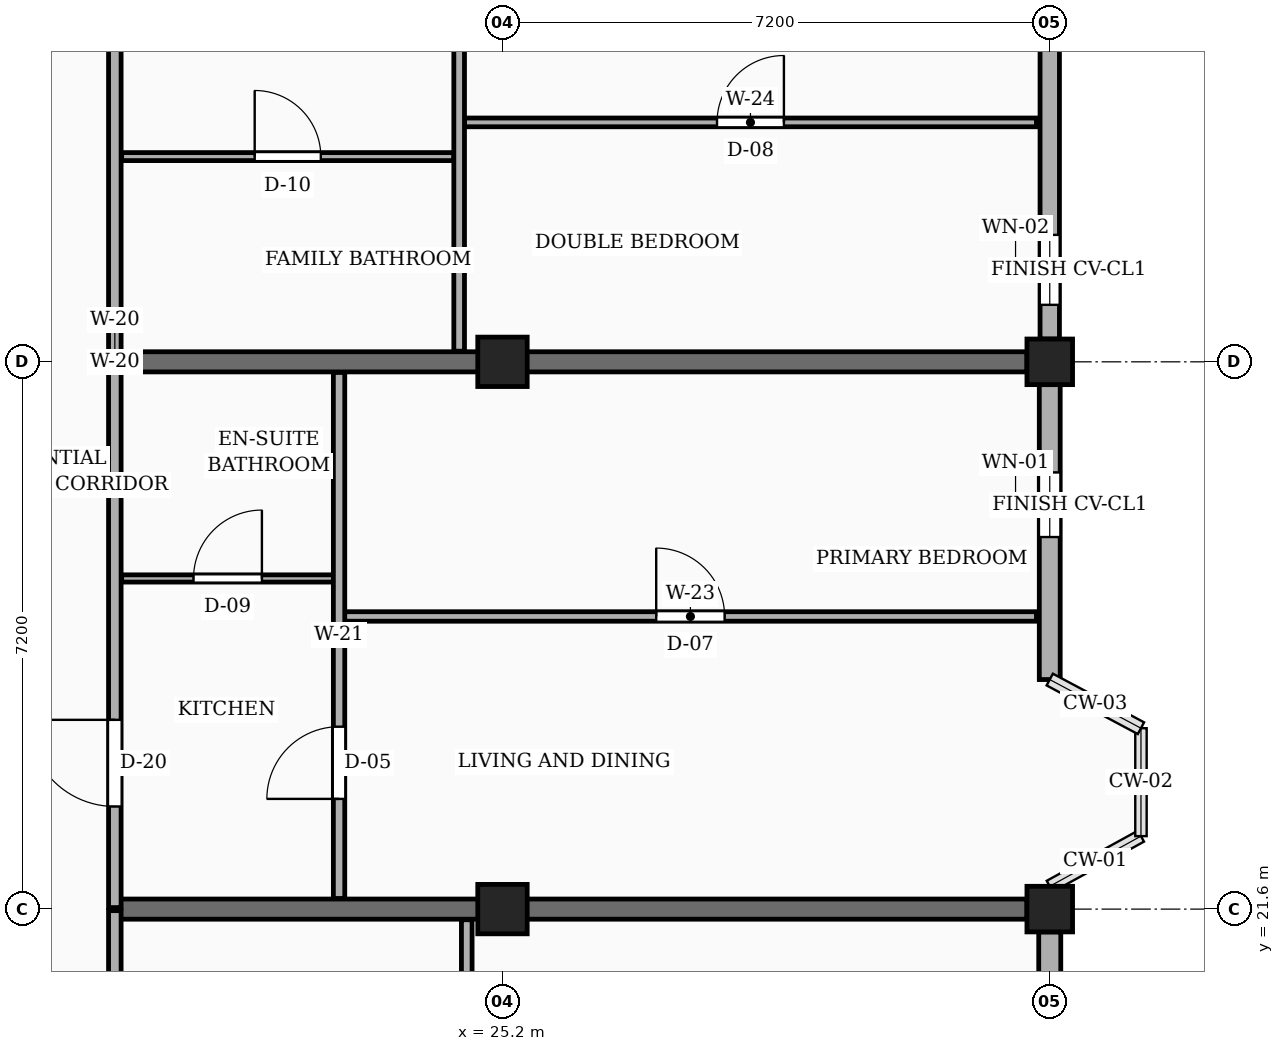
"""IFC4 building model, lengths in metres.
Left out: names, types, materials, properties, quantities, classifications, styles, units other than length and angle.
Written with IfcOpenShell. Run it as: python <this file> out.ifc"""

import sys

from ifc_helpers import new_model, si_unit, direction, frame, frame_2d, origin, origin_2d, place, context, subcontext, project, spatial, rectangle, extrude, element, fill, save


model = new_model("IFC4")
c1 = context("Model", 3, precision=1e-05, world=origin(), true_north=direction((0.0, 1.0)))
c2 = subcontext(c1, "Body", "Model", "MODEL_VIEW")
j1 = project(units=[si_unit("LENGTHUNIT", "METRE"), si_unit("PLANEANGLEUNIT", "RADIAN")], contexts=[c1])
p1 = place(None, origin())
s1 = spatial("IfcSite", under=j1, at=p1, CompositionType="ELEMENT")
p2 = place(p1, origin())
s2 = spatial("IfcBuilding", under=s1, at=p2, CompositionType="ELEMENT")
p3 = place(p2, frame((0.0, 0.0, 7.65)))
s3 = spatial("IfcBuildingStorey", under=s2, at=p3, CompositionType="ELEMENT", Elevation=7.65)
for number, where, z_axis, x_axis in (
    (1, (25.2, 21.6, 0.0), (0.0, 0.0, 1.0), (1.0, 0.0, 0.0)),
    (2, (25.2, 28.8, 0.0), (0.0, 0.0, 1.0), (1.0, 0.0, 0.0)),
):
    element("IfcColumn", number, at=place(p3, frame(where, z_axis=z_axis, x_axis=x_axis)), inside=s3, PredefinedType="COLUMN", context=c2, shape_type="SweptSolid", body=[
        extrude(rectangle(XDim=0.65, YDim=0.65, at=origin_2d()), origin(), (0.0, 0.0, 1.0), 3.15),
    ])
for number, where, z_axis, x_axis in (
    (3, (32.4, 21.6, 0.0), (0.0, 0.0, 1.0), (1.0, 0.0, 0.0)),
    (4, (32.4, 28.8, 0.0), (0.0, 0.0, 1.0), (1.0, 0.0, 0.0)),
):
    element("IfcColumn", number, at=place(p3, frame(where, z_axis=z_axis, x_axis=x_axis)), inside=s3, PredefinedType="COLUMN", context=c2, shape_type="SweptSolid", body=[
        extrude(rectangle(XDim=0.6, YDim=0.6, at=origin_2d()), origin(), (0.0, 0.0, 1.0), 3.15),
    ])
for number, where, z_axis, x_axis in (
    (5, (20.1, 21.6, 0.0), (0.0, 0.0, 1.0), (1.0, 0.0, 0.0)),
    (6, (20.1, 28.8, 0.0), (0.0, 0.0, 1.0), (1.0, 0.0, 0.0)),
):
    element("IfcWall", number, at=place(p3, frame(where, z_axis=z_axis, x_axis=x_axis)), inside=s3, PredefinedType="SOLIDWALL", context=c2, shape_type="SweptSolid", body=[
        extrude(rectangle(XDim=12.0, YDim=0.265, at=frame_2d((6.0, 0.0))), origin(), (0.0, 0.0, 1.0), 2.17),
    ])
p4 = place(p3, frame((32.4, 14.7, 0.0), z_axis=(0.0, 0.0, 1.0), x_axis=(0.0, 1.0, 0.0)))
e7 = element("IfcWall", 7, at=p4, inside=s3, PredefinedType="SOLIDWALL", context=c2, shape_type="SweptSolid", body=[
    extrude(rectangle(XDim=6.6, YDim=0.29, at=frame_2d((3.3, 0.0))), origin(), (0.0, 0.0, 1.0), 2.44),
])
p5 = place(p4, frame((0.45, 0.0, 0.78)))
e8 = element("IfcOpeningElement", 8, at=p5, cuts=e7, PredefinedType="OPENING", context=c2, shape_type="SweptSolid", body=[
    extrude(rectangle(XDim=1.35, YDim=1.44, at=frame_2d((0.675, 0.72))), frame((0.0, 0.155, 0.0), z_axis=(0.0, -1.0, 0.0), x_axis=(1.0, 0.0, 0.0)), (0.0, 0.0, 1.0), 0.31),
])
p6 = place(p4, frame((4.65, 0.0, 0.78)))
e9 = element("IfcOpeningElement", 9, at=p6, cuts=e7, PredefinedType="OPENING", context=c2, shape_type="SweptSolid", body=[
    extrude(rectangle(XDim=0.85, YDim=1.15, at=frame_2d((0.425, 0.575))), frame((0.0, 0.155, 0.0), z_axis=(0.0, -1.0, 0.0), x_axis=(1.0, 0.0, 0.0)), (0.0, 0.0, 1.0), 0.31),
])
p7 = place(p3, frame((32.4, 24.62, 0.0), z_axis=(0.0, 0.0, 1.0), x_axis=(0.0, 1.0, 0.0)))
e10 = element("IfcWall", 10, at=p7, inside=s3, PredefinedType="SOLIDWALL", context=c2, shape_type="SweptSolid", body=[
    extrude(rectangle(XDim=3.88, YDim=0.275, at=frame_2d((1.94, 0.0))), origin(), (0.0, 0.0, 1.0), 2.44),
])
p8 = place(p7, frame((1.875, 0.0, 0.78)))
e11 = element("IfcOpeningElement", 11, at=p8, cuts=e10, PredefinedType="OPENING", context=c2, shape_type="SweptSolid", body=[
    extrude(rectangle(XDim=0.85, YDim=1.15, at=frame_2d((0.425, 0.575))), frame((0.0, 0.147, 0.0), z_axis=(0.0, -1.0, 0.0), x_axis=(1.0, 0.0, 0.0)), (0.0, 0.0, 1.0), 0.295),
])
p9 = place(p3, frame((32.4, 29.1, 0.0), z_axis=(0.0, 0.0, 1.0), x_axis=(0.0, 1.0, 0.0)))
e12 = element("IfcWall", 12, at=p9, inside=s3, PredefinedType="SOLIDWALL", context=c2, shape_type="SweptSolid", body=[
    extrude(rectangle(XDim=6.6, YDim=0.255, at=frame_2d((3.3, 0.0))), origin(), (0.0, 0.0, 1.0), 2.44),
])
p10 = place(p9, frame((0.45, 0.0, 0.78)))
e13 = element("IfcOpeningElement", 13, at=p10, cuts=e12, PredefinedType="OPENING", context=c2, shape_type="SweptSolid", body=[
    extrude(rectangle(XDim=0.92, YDim=1.15, at=frame_2d((0.46, 0.575))), frame((0.0, 0.137, 0.0), z_axis=(0.0, -1.0, 0.0), x_axis=(1.0, 0.0, 0.0)), (0.0, 0.0, 1.0), 0.275),
])
p11 = place(p9, frame((4.65, 0.0, 0.78)))
e14 = element("IfcOpeningElement", 14, at=p11, cuts=e12, PredefinedType="OPENING", context=c2, shape_type="SweptSolid", body=[
    extrude(rectangle(XDim=1.08, YDim=1.15, at=frame_2d((0.54, 0.575))), frame((0.0, 0.137, 0.0), z_axis=(0.0, -1.0, 0.0), x_axis=(1.0, 0.0, 0.0)), (0.0, 0.0, 1.0), 0.275),
])
p12 = place(p3, frame((20.1, 14.42, 0.0), z_axis=(0.0, 0.0, 1.0), x_axis=(0.0, 1.0, 0.0)))
e15 = element("IfcWall", 15, at=p12, inside=s3, PredefinedType="PARTITIONING", context=c2, shape_type="SweptSolid", body=[
    extrude(rectangle(XDim=7.16, YDim=0.165, at=frame_2d((3.58, 0.0))), origin(), (0.0, 0.0, 1.0), 2.305),
])
p13 = place(p12, frame((4.78, 0.0, 0.0)))
e16 = element("IfcOpeningElement", 16, at=p13, cuts=e15, PredefinedType="OPENING", context=c2, shape_type="SweptSolid", body=[
    extrude(rectangle(XDim=0.94, YDim=2.12, at=frame_2d((0.47, 1.06))), frame((0.0, 0.093, 0.0), z_axis=(0.0, -1.0, 0.0), x_axis=(1.0, 0.0, 0.0)), (0.0, 0.0, 1.0), 0.185),
])
p14 = place(p3, frame((20.1, 21.62, 0.0), z_axis=(0.0, 0.0, 1.0), x_axis=(0.0, 1.0, 0.0)))
e17 = element("IfcWall", 17, at=p14, inside=s3, PredefinedType="PARTITIONING", context=c2, shape_type="SweptSolid", body=[
    extrude(rectangle(XDim=7.16, YDim=0.165, at=frame_2d((3.58, 0.0))), origin(), (0.0, 0.0, 1.0), 2.305),
])
p15 = place(p14, frame((1.33, 0.0, 0.0)))
e18 = element("IfcOpeningElement", 18, at=p15, cuts=e17, PredefinedType="OPENING", context=c2, shape_type="SweptSolid", body=[
    extrude(rectangle(XDim=1.14, YDim=2.18, at=frame_2d((0.57, 1.09))), frame((0.0, 0.093, 0.0), z_axis=(0.0, -1.0, 0.0), x_axis=(1.0, 0.0, 0.0)), (0.0, 0.0, 1.0), 0.185),
])
p16 = place(p3, frame((20.1, 28.82, 0.0), z_axis=(0.0, 0.0, 1.0), x_axis=(0.0, 1.0, 0.0)))
e19 = element("IfcWall", 19, at=p16, inside=s3, PredefinedType="PARTITIONING", context=c2, shape_type="SweptSolid", body=[
    extrude(rectangle(XDim=7.16, YDim=0.165, at=frame_2d((3.58, 0.0))), origin(), (0.0, 0.0, 1.0), 2.305),
])
p17 = place(p16, frame((4.78, 0.0, 0.0)))
e20 = element("IfcOpeningElement", 20, at=p17, cuts=e19, PredefinedType="OPENING", context=c2, shape_type="SweptSolid", body=[
    extrude(rectangle(XDim=1.0, YDim=2.15, at=frame_2d((0.5, 1.075))), frame((0.0, 0.093, 0.0), z_axis=(0.0, -1.0, 0.0), x_axis=(1.0, 0.0, 0.0)), (0.0, 0.0, 1.0), 0.185),
])
p18 = place(p3, frame((24.73, 14.54, 0.0), z_axis=(0.0, 0.0, 1.0), x_axis=(0.0, 1.0, 0.0)))
e21 = element("IfcWall", 21, at=p18, inside=s3, PredefinedType="PARTITIONING", context=c2, shape_type="SweptSolid", body=[
    extrude(rectangle(XDim=6.92, YDim=0.14, at=frame_2d((3.46, 0.0))), origin(), (0.0, 0.0, 1.0), 2.305),
])
p19 = place(p18, frame((4.66, 0.0, 0.0)))
e22 = element("IfcOpeningElement", 22, at=p19, cuts=e21, PredefinedType="OPENING", context=c2, shape_type="SweptSolid", body=[
    extrude(rectangle(XDim=0.95, YDim=2.1, at=frame_2d((0.475, 1.05))), frame((0.0, 0.08, 0.0), z_axis=(0.0, -1.0, 0.0), x_axis=(1.0, 0.0, 0.0)), (0.0, 0.0, 1.0), 0.16),
])
p20 = place(p3, frame((23.12, 25.45, 0.0), z_axis=(0.0, 0.0, 1.0), x_axis=(1.0, 0.0, 0.0)))
e23 = element("IfcWall", 23, at=p20, inside=s3, PredefinedType="PARTITIONING", context=c2, shape_type="SweptSolid", body=[
    extrude(rectangle(XDim=9.105, YDim=0.125, at=frame_2d((4.552, 0.0))), origin(), (0.0, 0.0, 1.0), 2.305),
])
p21 = place(p20, frame((4.103, 0.0, 0.0)))
e24 = element("IfcOpeningElement", 24, at=p21, cuts=e23, PredefinedType="OPENING", context=c2, shape_type="SweptSolid", body=[
    extrude(rectangle(XDim=0.9, YDim=2.1, at=frame_2d((0.45, 1.05))), frame((0.0, 0.073, 0.0), z_axis=(0.0, -1.0, 0.0), x_axis=(1.0, 0.0, 0.0)), (0.0, 0.0, 1.0), 0.145),
])
p22 = place(p3, frame((20.19, 25.95, 0.0), z_axis=(0.0, 0.0, 1.0), x_axis=(1.0, 0.0, 0.0)))
e25 = element("IfcWall", 25, at=p22, inside=s3, PredefinedType="PARTITIONING", context=c2, shape_type="SweptSolid", body=[
    extrude(rectangle(XDim=2.79, YDim=0.095, at=frame_2d((1.395, 0.0))), origin(), (0.0, 0.0, 1.0), 2.305),
])
p23 = place(p22, frame((0.945, 0.0, 0.0)))
e26 = element("IfcOpeningElement", 26, at=p23, cuts=e25, PredefinedType="OPENING", context=c2, shape_type="SweptSolid", body=[
    extrude(rectangle(XDim=0.9, YDim=2.05, at=frame_2d((0.45, 1.025))), frame((0.0, 0.058, 0.0), z_axis=(0.0, -1.0, 0.0), x_axis=(1.0, 0.0, 0.0)), (0.0, 0.0, 1.0), 0.115),
])
p24 = place(p3, frame((23.05, 21.74, 0.0), z_axis=(0.0, 0.0, 1.0), x_axis=(0.0, 1.0, 0.0)))
e27 = element("IfcWall", 27, at=p24, inside=s3, PredefinedType="PARTITIONING", context=c2, shape_type="SweptSolid", body=[
    extrude(rectangle(XDim=6.92, YDim=0.15, at=frame_2d((3.46, 0.0))), origin(), (0.0, 0.0, 1.0), 2.305),
])
p25 = place(p24, frame((1.31, 0.0, 0.0)))
e28 = element("IfcOpeningElement", 28, at=p25, cuts=e27, PredefinedType="OPENING", context=c2, shape_type="SweptSolid", body=[
    extrude(rectangle(XDim=0.95, YDim=2.1, at=frame_2d((0.475, 1.05))), frame((0.0, 0.085, 0.0), z_axis=(0.0, -1.0, 0.0), x_axis=(1.0, 0.0, 0.0)), (0.0, 0.0, 1.0), 0.17),
])
p26 = place(p3, frame((24.7, 31.95, 0.0), z_axis=(0.0, 0.0, 1.0), x_axis=(1.0, 0.0, 0.0)))
e29 = element("IfcWall", 29, at=p26, inside=s3, PredefinedType="PARTITIONING", context=c2, shape_type="SweptSolid", body=[
    extrude(rectangle(XDim=7.525, YDim=0.115, at=frame_2d((3.763, 0.0))), origin(), (0.0, 0.0, 1.0), 2.305),
])
p27 = place(p26, frame((3.323, 0.0, 0.0)))
e30 = element("IfcOpeningElement", 30, at=p27, cuts=e29, PredefinedType="OPENING", context=c2, shape_type="SweptSolid", body=[
    extrude(rectangle(XDim=0.88, YDim=2.08, at=frame_2d((0.44, 1.04))), frame((0.0, 0.067, 0.0), z_axis=(0.0, -1.0, 0.0), x_axis=(1.0, 0.0, 0.0)), (0.0, 0.0, 1.0), 0.135),
])
p28 = place(p3, frame((20.19, 31.5, 0.0), z_axis=(0.0, 0.0, 1.0), x_axis=(1.0, 0.0, 0.0)))
e31 = element("IfcWall", 31, at=p28, inside=s3, PredefinedType="PARTITIONING", context=c2, shape_type="SweptSolid", body=[
    extrude(rectangle(XDim=4.37, YDim=0.105, at=frame_2d((2.185, 0.0))), origin(), (0.0, 0.0, 1.0), 2.305),
])
p29 = place(p28, frame((1.75, 0.0, 0.0)))
e32 = element("IfcOpeningElement", 32, at=p29, cuts=e31, PredefinedType="OPENING", context=c2, shape_type="SweptSolid", body=[
    extrude(rectangle(XDim=0.87, YDim=2.05, at=frame_2d((0.435, 1.025))), frame((0.0, 0.062, 0.0), z_axis=(0.0, -1.0, 0.0), x_axis=(1.0, 0.0, 0.0)), (0.0, 0.0, 1.0), 0.125),
])
p30 = place(p3, frame((24.63, 28.94, 0.0), z_axis=(0.0, 0.0, 1.0), x_axis=(0.0, 1.0, 0.0)))
e33 = element("IfcWall", 33, at=p30, inside=s3, PredefinedType="PARTITIONING", context=c2, shape_type="SweptSolid", body=[
    extrude(rectangle(XDim=6.92, YDim=0.14, at=frame_2d((3.46, 0.0))), origin(), (0.0, 0.0, 1.0), 2.305),
])
p31 = place(p30, frame((4.66, 0.0, 0.0)))
e34 = element("IfcOpeningElement", 34, at=p31, cuts=e33, PredefinedType="OPENING", context=c2, shape_type="SweptSolid", body=[
    extrude(rectangle(XDim=0.92, YDim=2.1, at=frame_2d((0.46, 1.05))), frame((0.0, 0.08, 0.0), z_axis=(0.0, -1.0, 0.0), x_axis=(1.0, 0.0, 0.0)), (0.0, 0.0, 1.0), 0.16),
])
p32 = place(p8, origin())
e35 = element("IfcWindow", 35, at=p32, inside=s3, PartitioningType="SINGLE_PANEL", PredefinedType="WINDOW", context=c2, shape_type="SweptSolid", body=[
    extrude(rectangle(XDim=0.85, YDim=1.15, at=frame_2d((0.425, 0.575))), frame((0.0, 0.03, 0.0), z_axis=(0.0, -1.0, 0.0), x_axis=(1.0, 0.0, 0.0)), (0.0, 0.0, 1.0), 0.06),
])
fill(e11, e35)
p33 = place(p10, origin())
e36 = element("IfcWindow", 36, at=p33, inside=s3, PartitioningType="SINGLE_PANEL", PredefinedType="WINDOW", context=c2, shape_type="SweptSolid", body=[
    extrude(rectangle(XDim=0.92, YDim=1.15, at=frame_2d((0.46, 0.575))), frame((0.0, 0.03, 0.0), z_axis=(0.0, -1.0, 0.0), x_axis=(1.0, 0.0, 0.0)), (0.0, 0.0, 1.0), 0.06),
])
fill(e13, e36)
p34 = place(p15, origin())
e37 = element("IfcDoor", 37, at=p34, inside=s3, OperationType="SINGLE_SWING_RIGHT", PredefinedType="DOOR", context=c2, shape_type="SweptSolid", body=[
    extrude(rectangle(XDim=1.14, YDim=2.18, at=frame_2d((0.57, 1.09))), frame((0.0, 0.025, 0.0), z_axis=(0.0, -1.0, 0.0), x_axis=(1.0, 0.0, 0.0)), (0.0, 0.0, 1.0), 0.05),
])
fill(e18, e37)
p35 = place(p21, origin())
e38 = element("IfcDoor", 38, at=p35, inside=s3, OperationType="SINGLE_SWING_LEFT", PredefinedType="DOOR", context=c2, shape_type="SweptSolid", body=[
    extrude(rectangle(XDim=0.9, YDim=2.1, at=frame_2d((0.45, 1.05))), frame((0.0, 0.025, 0.0), z_axis=(0.0, -1.0, 0.0), x_axis=(1.0, 0.0, 0.0)), (0.0, 0.0, 1.0), 0.05),
])
fill(e24, e38)
p36 = place(p23, origin())
e39 = element("IfcDoor", 39, at=p36, inside=s3, OperationType="SINGLE_SWING_RIGHT", PredefinedType="DOOR", context=c2, shape_type="SweptSolid", body=[
    extrude(rectangle(XDim=0.9, YDim=2.05, at=frame_2d((0.45, 1.025))), frame((0.0, 0.025, 0.0), z_axis=(0.0, -1.0, 0.0), x_axis=(1.0, 0.0, 0.0)), (0.0, 0.0, 1.0), 0.05),
])
fill(e26, e39)
p37 = place(p25, origin())
e40 = element("IfcDoor", 40, at=p37, inside=s3, OperationType="SINGLE_SWING_LEFT", PredefinedType="DOOR", context=c2, shape_type="SweptSolid", body=[
    extrude(rectangle(XDim=0.95, YDim=2.1, at=frame_2d((0.475, 1.05))), frame((0.0, 0.025, 0.0), z_axis=(0.0, -1.0, 0.0), x_axis=(1.0, 0.0, 0.0)), (0.0, 0.0, 1.0), 0.05),
])
fill(e28, e40)
p38 = place(p27, origin())
e41 = element("IfcDoor", 41, at=p38, inside=s3, OperationType="SINGLE_SWING_RIGHT", PredefinedType="DOOR", context=c2, shape_type="SweptSolid", body=[
    extrude(rectangle(XDim=0.88, YDim=2.08, at=frame_2d((0.44, 1.04))), frame((0.0, 0.025, 0.0), z_axis=(0.0, -1.0, 0.0), x_axis=(1.0, 0.0, 0.0)), (0.0, 0.0, 1.0), 0.05),
])
fill(e30, e41)
p39 = place(p29, origin())
e42 = element("IfcDoor", 42, at=p39, inside=s3, OperationType="SINGLE_SWING_LEFT", PredefinedType="DOOR", context=c2, shape_type="SweptSolid", body=[
    extrude(rectangle(XDim=0.87, YDim=2.05, at=frame_2d((0.435, 1.025))), frame((0.0, 0.025, 0.0), z_axis=(0.0, -1.0, 0.0), x_axis=(1.0, 0.0, 0.0)), (0.0, 0.0, 1.0), 0.05),
])
fill(e32, e42)
save(model, sys.argv[1])
